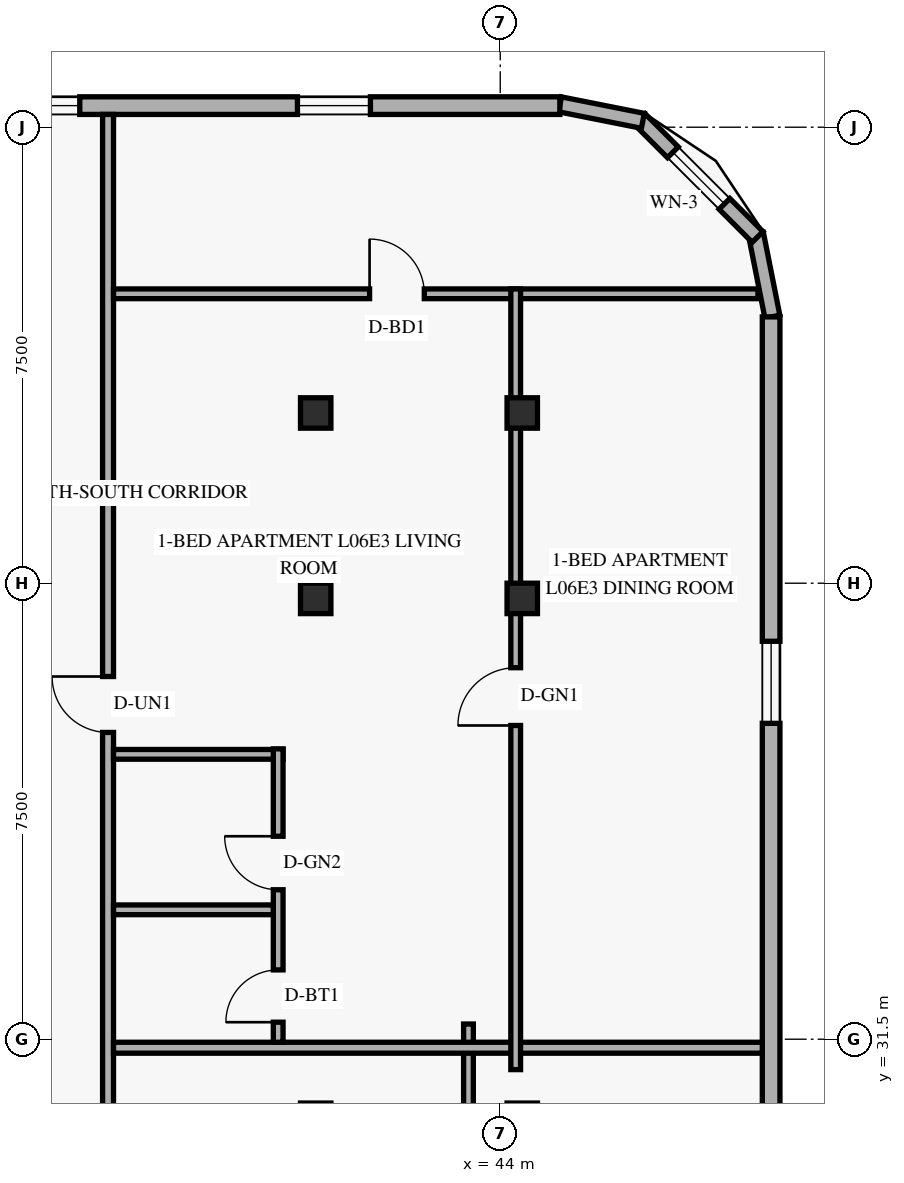
"""IFC4 building model, lengths in metres.
Left out: names, types, materials, properties, quantities, classifications, styles, units other than length and angle.
Written with IfcOpenShell. Run it as: python <this file> out.ifc"""

import sys

from ifc_helpers import new_model, si_unit, direction, frame, frame_2d, origin, origin_2d, place, context, subcontext, project, spatial, rectangle, hollow_rectangle, extrude, element, fill, save


model = new_model("IFC4")
c1 = context("Model", 3, precision=1e-05, world=origin(), true_north=direction((0.0, 1.0)))
c2 = subcontext(c1, "Body", "Model", "MODEL_VIEW")
j1 = project(units=[si_unit("LENGTHUNIT", "METRE"), si_unit("PLANEANGLEUNIT", "RADIAN")], contexts=[c1])
p1 = place(None, origin())
s1 = spatial("IfcSite", under=j1, at=p1, CompositionType="ELEMENT")
p2 = place(p1, origin())
s2 = spatial("IfcBuilding", under=s1, at=p2, CompositionType="ELEMENT")
p3 = place(p2, frame((0.0, 0.0, 27.6)))
s3 = spatial("IfcBuildingStorey", under=s2, at=p3, CompositionType="ELEMENT", Elevation=27.6)
for number, where, z_axis, x_axis in (
    (1, (40.902, 38.75, 0.0), (0.035, 0.0, 0.999), (0.0, 1.0, 0.0)),
    (2, (40.902, 41.8, 0.0), (0.035, 0.0, 0.999), (0.0, 1.0, 0.0)),
):
    element("IfcColumn", number, at=place(p3, frame(where, z_axis=z_axis, x_axis=x_axis)), inside=s3, PredefinedType="COLUMN", context=c2, shape_type="SweptSolid", body=[
        extrude(hollow_rectangle(XDim=0.5, YDim=0.5, WallThickness=0.022, at=origin_2d()), origin(), (0.0, 0.0, 1.0), 3.602),
    ])
for number, where, z_axis, x_axis in (
    (3, (44.258, 38.75, 0.0), (0.058, 0.0, 0.998), (0.0, 1.0, 0.0)),
    (4, (44.258, 41.8, 0.0), (0.058, 0.0, 0.998), (0.0, 1.0, 0.0)),
):
    element("IfcColumn", number, at=place(p3, frame(where, z_axis=z_axis, x_axis=x_axis)), inside=s3, PredefinedType="COLUMN", context=c2, shape_type="SweptSolid", body=[
        extrude(hollow_rectangle(XDim=0.5, YDim=0.5, WallThickness=0.022, at=origin_2d()), origin(), (0.0, 0.0, 1.0), 3.606),
    ])
p4 = place(p3, frame((48.476, 43.384, 0.0), z_axis=(0.0, 0.0, 1.0), x_axis=(-0.19496651342, 0.980809899341, 0.0)))
e5 = element("IfcWall", 5, at=p4, inside=s3, PredefinedType="SOLIDWALL", context=c2, shape_type="SweptSolid", body=[
    extrude(rectangle(XDim=1.389, YDim=0.25, at=frame_2d((0.694, 0.0))), origin(), (0.0, 0.0, 1.0), 3.36),
])
p5 = place(p3, frame((48.232, 44.695, 0.0), z_axis=(0.0, 0.0, 1.0), x_axis=(-0.707106781187, 0.707106781187, 0.0)))
e6 = element("IfcWall", 6, at=p5, inside=s3, PredefinedType="SOLIDWALL", context=c2, shape_type="SweptSolid", body=[
    extrude(rectangle(XDim=2.739, YDim=0.25, at=frame_2d((1.37, 0.0))), origin(), (0.0, 0.0, 1.0), 3.36),
])
p6 = place(p5, frame((0.77, 0.0, 0.85)))
e7 = element("IfcOpeningElement", 7, at=p6, cuts=e6, PredefinedType="OPENING", context=c2, shape_type="SweptSolid", body=[
    extrude(rectangle(XDim=1.2, YDim=1.5, at=frame_2d((0.6, 0.75))), frame((0.0, 0.135, 0.0), z_axis=(0.0, -1.0, 0.0), x_axis=(1.0, 0.0, 0.0)), (0.0, 0.0, 1.0), 0.27),
])
p7 = place(p3, frame((46.345, 46.605, 0.0), z_axis=(0.0, 0.0, 1.0), x_axis=(-0.980809899341, 0.19496651342, 0.0)))
e8 = element("IfcWall", 8, at=p7, inside=s3, PredefinedType="SOLIDWALL", context=c2, shape_type="SweptSolid", body=[
    extrude(rectangle(XDim=1.389, YDim=0.25, at=frame_2d((0.694, 0.0))), origin(), (0.0, 0.0, 1.0), 3.36),
])
p8 = place(p3, frame((48.455, 4.62, 0.0), z_axis=(0.0, 0.0, 1.0), x_axis=(0.0, 1.0, 0.0)))
e9 = element("IfcWall", 9, at=p8, inside=s3, PredefinedType="SOLIDWALL", context=c2, shape_type="SweptSolid", body=[
    extrude(rectangle(XDim=38.76, YDim=0.29, at=frame_2d((19.38, 0.0))), origin(), (0.0, 0.0, 1.0), 3.36),
])
p9 = place(p8, frame((4.875, 0.0, 0.85)))
e10 = element("IfcOpeningElement", 10, at=p9, cuts=e9, PredefinedType="OPENING", context=c2, shape_type="SweptSolid", body=[
    extrude(rectangle(XDim=1.35, YDim=1.55, at=frame_2d((0.675, 0.775))), frame((0.0, 0.155, 0.0), z_axis=(0.0, -1.0, 0.0), x_axis=(1.0, 0.0, 0.0)), (0.0, 0.0, 1.0), 0.31),
])
p10 = place(p8, frame((12.579, 0.0, 0.85)))
e11 = element("IfcOpeningElement", 11, at=p10, cuts=e9, PredefinedType="OPENING", context=c2, shape_type="SweptSolid", body=[
    extrude(rectangle(XDim=1.35, YDim=1.55, at=frame_2d((0.675, 0.775))), frame((0.0, 0.155, 0.0), z_axis=(0.0, -1.0, 0.0), x_axis=(1.0, 0.0, 0.0)), (0.0, 0.0, 1.0), 0.31),
])
p11 = place(p8, frame((18.404, 0.0, 0.85)))
e12 = element("IfcOpeningElement", 12, at=p11, cuts=e9, PredefinedType="OPENING", context=c2, shape_type="SweptSolid", body=[
    extrude(rectangle(XDim=1.35, YDim=1.55, at=frame_2d((0.675, 0.775))), frame((0.0, 0.155, 0.0), z_axis=(0.0, -1.0, 0.0), x_axis=(1.0, 0.0, 0.0)), (0.0, 0.0, 1.0), 0.31),
])
p12 = place(p8, frame((24.07, 0.0, 0.85)))
e13 = element("IfcOpeningElement", 13, at=p12, cuts=e9, PredefinedType="OPENING", context=c2, shape_type="SweptSolid", body=[
    extrude(rectangle(XDim=1.35, YDim=1.55, at=frame_2d((0.675, 0.775))), frame((0.0, 0.155, 0.0), z_axis=(0.0, -1.0, 0.0), x_axis=(1.0, 0.0, 0.0)), (0.0, 0.0, 1.0), 0.31),
])
p13 = place(p8, frame((32.075, 0.0, 0.85)))
e14 = element("IfcOpeningElement", 14, at=p13, cuts=e9, PredefinedType="OPENING", context=c2, shape_type="SweptSolid", body=[
    extrude(rectangle(XDim=1.35, YDim=1.55, at=frame_2d((0.675, 0.775))), frame((0.0, 0.155, 0.0), z_axis=(0.0, -1.0, 0.0), x_axis=(1.0, 0.0, 0.0)), (0.0, 0.0, 1.0), 0.31),
])
p14 = place(p3, frame((44.98, 46.855, 0.0), z_axis=(0.0, 0.0, 1.0), x_axis=(-1.0, 0.0, 0.0)))
e15 = element("IfcWall", 15, at=p14, inside=s3, PredefinedType="SOLIDWALL", context=c2, shape_type="SweptSolid", body=[
    extrude(rectangle(XDim=39.56, YDim=0.29, at=frame_2d((19.78, 0.0))), origin(), (0.0, 0.0, 1.0), 3.36),
])
p15 = place(p14, frame((35.52, 0.0, 0.85)))
e16 = element("IfcOpeningElement", 16, at=p15, cuts=e15, PredefinedType="OPENING", context=c2, shape_type="SweptSolid", body=[
    extrude(rectangle(XDim=1.2, YDim=1.5, at=frame_2d((0.6, 0.75))), frame((0.0, 0.155, 0.0), z_axis=(0.0, -1.0, 0.0), x_axis=(1.0, 0.0, 0.0)), (0.0, 0.0, 1.0), 0.31),
])
p16 = place(p14, frame((31.18, 0.0, 0.85)))
e17 = element("IfcOpeningElement", 17, at=p16, cuts=e15, PredefinedType="OPENING", context=c2, shape_type="SweptSolid", body=[
    extrude(rectangle(XDim=1.2, YDim=1.5, at=frame_2d((0.6, 0.75))), frame((0.0, 0.155, 0.0), z_axis=(0.0, -1.0, 0.0), x_axis=(1.0, 0.0, 0.0)), (0.0, 0.0, 1.0), 0.31),
])
p17 = place(p14, frame((26.925, 0.0, 0.85)))
e18 = element("IfcOpeningElement", 18, at=p17, cuts=e15, PredefinedType="OPENING", context=c2, shape_type="SweptSolid", body=[
    extrude(rectangle(XDim=1.2, YDim=1.5, at=frame_2d((0.6, 0.75))), frame((0.0, 0.155, 0.0), z_axis=(0.0, -1.0, 0.0), x_axis=(1.0, 0.0, 0.0)), (0.0, 0.0, 1.0), 0.31),
])
p18 = place(p14, frame((21.5, 0.0, 0.85)))
e19 = element("IfcOpeningElement", 19, at=p18, cuts=e15, PredefinedType="OPENING", context=c2, shape_type="SweptSolid", body=[
    extrude(rectangle(XDim=1.2, YDim=1.5, at=frame_2d((0.6, 0.75))), frame((0.0, 0.155, 0.0), z_axis=(0.0, -1.0, 0.0), x_axis=(1.0, 0.0, 0.0)), (0.0, 0.0, 1.0), 0.31),
])
p19 = place(p14, frame((16.265, 0.0, 0.85)))
e20 = element("IfcOpeningElement", 20, at=p19, cuts=e15, PredefinedType="OPENING", context=c2, shape_type="SweptSolid", body=[
    extrude(rectangle(XDim=1.2, YDim=1.5, at=frame_2d((0.6, 0.75))), frame((0.0, 0.155, 0.0), z_axis=(0.0, -1.0, 0.0), x_axis=(1.0, 0.0, 0.0)), (0.0, 0.0, 1.0), 0.31),
])
p20 = place(p14, frame((11.03, 0.0, 0.85)))
e21 = element("IfcOpeningElement", 21, at=p20, cuts=e15, PredefinedType="OPENING", context=c2, shape_type="SweptSolid", body=[
    extrude(rectangle(XDim=1.2, YDim=1.5, at=frame_2d((0.6, 0.75))), frame((0.0, 0.155, 0.0), z_axis=(0.0, -1.0, 0.0), x_axis=(1.0, 0.0, 0.0)), (0.0, 0.0, 1.0), 0.31),
])
p21 = place(p14, frame((7.895, 0.0, 0.85)))
e22 = element("IfcOpeningElement", 22, at=p21, cuts=e15, PredefinedType="OPENING", context=c2, shape_type="SweptSolid", body=[
    extrude(rectangle(XDim=1.2, YDim=1.5, at=frame_2d((0.6, 0.75))), frame((0.0, 0.155, 0.0), z_axis=(0.0, -1.0, 0.0), x_axis=(1.0, 0.0, 0.0)), (0.0, 0.0, 1.0), 0.31),
])
p22 = place(p14, frame((3.115, 0.0, 0.85)))
e23 = element("IfcOpeningElement", 23, at=p22, cuts=e15, PredefinedType="OPENING", context=c2, shape_type="SweptSolid", body=[
    extrude(rectangle(XDim=1.2, YDim=1.5, at=frame_2d((0.6, 0.75))), frame((0.0, 0.155, 0.0), z_axis=(0.0, -1.0, 0.0), x_axis=(1.0, 0.0, 0.0)), (0.0, 0.0, 1.0), 0.31),
])
p23 = place(p3, frame((37.55, 1.29, 0.0), z_axis=(0.0, 0.0, 1.0), x_axis=(0.0, 1.0, 0.0)))
e24 = element("IfcWall", 24, at=p23, inside=s3, PredefinedType="STANDARD", context=c2, shape_type="SweptSolid", body=[
    extrude(rectangle(XDim=45.42, YDim=0.18, at=frame_2d((22.71, 0.0))), origin(), (0.0, 0.0, 1.0), 2.649),
])
p24 = place(p23, frame((8.49, 0.0, 0.0)))
e25 = element("IfcOpeningElement", 25, at=p24, cuts=e24, PredefinedType="OPENING", context=c2, shape_type="SweptSolid", body=[
    extrude(rectangle(XDim=0.92, YDim=2.15, at=frame_2d((0.46, 1.075))), frame((0.0, 0.1, 0.0), z_axis=(0.0, -1.0, 0.0), x_axis=(1.0, 0.0, 0.0)), (0.0, 0.0, 1.0), 0.2),
])
p25 = place(p23, frame((20.073, 0.0, 0.0)))
e26 = element("IfcOpeningElement", 26, at=p25, cuts=e24, PredefinedType="OPENING", context=c2, shape_type="SweptSolid", body=[
    extrude(rectangle(XDim=0.92, YDim=2.15, at=frame_2d((0.46, 1.075))), frame((0.0, 0.1, 0.0), z_axis=(0.0, -1.0, 0.0), x_axis=(1.0, 0.0, 0.0)), (0.0, 0.0, 1.0), 0.2),
])
p26 = place(p23, frame((35.256, 0.0, 0.0)))
e27 = element("IfcOpeningElement", 27, at=p26, cuts=e24, PredefinedType="OPENING", context=c2, shape_type="SweptSolid", body=[
    extrude(rectangle(XDim=0.92, YDim=2.15, at=frame_2d((0.46, 1.075))), frame((0.0, 0.1, 0.0), z_axis=(0.0, -1.0, 0.0), x_axis=(1.0, 0.0, 0.0)), (0.0, 0.0, 1.0), 0.2),
])
p27 = place(p3, frame((43.477, 27.29, 0.0), z_axis=(0.0, 0.0, 1.0), x_axis=(0.0, 1.0, 0.0)))
e28 = element("IfcWall", 28, at=p27, inside=s3, PredefinedType="PARTITIONING", context=c2, shape_type="SweptSolid", body=[
    extrude(rectangle(XDim=4.46, YDim=0.16, at=frame_2d((2.23, 0.0))), origin(), (0.0, 0.0, 1.0), 2.649),
])
p28 = place(p3, frame((37.64, 31.36, 0.0), z_axis=(0.0, 0.0, 1.0), x_axis=(1.0, 0.0, 0.0)))
e29 = element("IfcWall", 29, at=p28, inside=s3, PredefinedType="PARTITIONING", context=c2, shape_type="SweptSolid", body=[
    extrude(rectangle(XDim=10.67, YDim=0.18, at=frame_2d((5.335, 0.0))), origin(), (0.0, 0.0, 1.0), 2.649),
])
p29 = place(p3, frame((37.64, 43.76, 0.0), z_axis=(0.0, 0.0, 1.0), x_axis=(1.0, 0.0, 0.0)))
e30 = element("IfcWall", 30, at=p29, inside=s3, PredefinedType="PARTITIONING", context=c2, shape_type="SweptSolid", body=[
    extrude(rectangle(XDim=10.598, YDim=0.16, at=frame_2d((5.299, 0.0))), origin(), (0.0, 0.0, 1.0), 3.36),
])
p30 = place(p29, frame((4.211, 0.0, 0.0)))
e31 = element("IfcOpeningElement", 31, at=p30, cuts=e30, PredefinedType="OPENING", context=c2, shape_type="SweptSolid", body=[
    extrude(rectangle(XDim=0.9, YDim=2.14, at=frame_2d((0.45, 1.07))), frame((0.0, 0.09, 0.0), z_axis=(0.0, -1.0, 0.0), x_axis=(1.0, 0.0, 0.0)), (0.0, 0.0, 1.0), 0.18),
])
p31 = place(p3, frame((37.64, 36.186, 0.0), z_axis=(0.0, 0.0, 1.0), x_axis=(1.0, 0.0, 0.0)))
e32 = element("IfcWall", 32, at=p31, inside=s3, PredefinedType="PLUMBINGWALL", context=c2, shape_type="SweptSolid", body=[
    extrude(rectangle(XDim=2.788, YDim=0.16, at=frame_2d((1.394, 0.0))), origin(), (0.0, 0.0, 1.0), 3.36),
])
p32 = place(p3, frame((40.348, 31.45, 0.0), z_axis=(0.0, 0.0, 1.0), x_axis=(0.0, 1.0, 0.0)))
e33 = element("IfcWall", 33, at=p32, inside=s3, PredefinedType="PLUMBINGWALL", context=c2, shape_type="SweptSolid", body=[
    extrude(rectangle(XDim=4.825, YDim=0.16, at=frame_2d((2.413, 0.0))), origin(), (0.0, 0.0, 1.0), 2.932),
])
p33 = place(p32, frame((0.33, 0.0, 0.0)))
e34 = element("IfcOpeningElement", 34, at=p33, cuts=e33, PredefinedType="OPENING", context=c2, shape_type="SweptSolid", body=[
    extrude(rectangle(XDim=0.86, YDim=2.12, at=frame_2d((0.43, 1.06))), frame((0.0, 0.09, 0.0), z_axis=(0.0, -1.0, 0.0), x_axis=(1.0, 0.0, 0.0)), (0.0, 0.0, 1.0), 0.18),
])
p34 = place(p32, frame((2.508, 0.0, 0.0)))
e35 = element("IfcOpeningElement", 35, at=p34, cuts=e33, PredefinedType="OPENING", context=c2, shape_type="SweptSolid", body=[
    extrude(rectangle(XDim=0.88, YDim=2.12, at=frame_2d((0.44, 1.06))), frame((0.0, 0.09, 0.0), z_axis=(0.0, -1.0, 0.0), x_axis=(1.0, 0.0, 0.0)), (0.0, 0.0, 1.0), 0.18),
])
p35 = place(p3, frame((37.64, 33.628, 0.0), z_axis=(0.0, 0.0, 1.0), x_axis=(1.0, 0.0, 0.0)))
e36 = element("IfcWall", 36, at=p35, inside=s3, PredefinedType="PLUMBINGWALL", context=c2, shape_type="SweptSolid", body=[
    extrude(rectangle(XDim=2.628, YDim=0.16, at=frame_2d((1.314, 0.0))), origin(), (0.0, 0.0, 1.0), 3.36),
])
p36 = place(p3, frame((44.254, 31.0, 0.0), z_axis=(0.0, 0.0, 1.0), x_axis=(0.0, 1.0, 0.0)))
e37 = element("IfcWall", 37, at=p36, inside=s3, PredefinedType="PARTITIONING", context=c2, shape_type="SweptSolid", body=[
    extrude(rectangle(XDim=12.84, YDim=0.16, at=frame_2d((6.42, 0.0))), origin(), (0.0, 0.0, 1.0), 2.649),
])
p37 = place(p36, frame((5.66, 0.0, 0.0)))
e38 = element("IfcOpeningElement", 38, at=p37, cuts=e37, PredefinedType="OPENING", context=c2, shape_type="SweptSolid", body=[
    extrude(rectangle(XDim=0.95, YDim=2.15, at=frame_2d((0.475, 1.075))), frame((0.0, 0.09, 0.0), z_axis=(0.0, -1.0, 0.0), x_axis=(1.0, 0.0, 0.0)), (0.0, 0.0, 1.0), 0.18),
])
p38 = place(p6, origin())
e39 = element("IfcWindow", 39, at=p38, inside=s3, PartitioningType="SINGLE_PANEL", PredefinedType="WINDOW", context=c2, shape_type="SweptSolid", body=[
    extrude(rectangle(XDim=1.2, YDim=1.5, at=frame_2d((0.6, 0.75))), frame((0.0, 0.03, 0.0), z_axis=(0.0, -1.0, 0.0), x_axis=(1.0, 0.0, 0.0)), (0.0, 0.0, 1.0), 0.06),
])
fill(e7, e39)
p39 = place(p13, origin())
e40 = element("IfcWindow", 40, at=p39, inside=s3, PartitioningType="SINGLE_PANEL", PredefinedType="WINDOW", context=c2, shape_type="SweptSolid", body=[
    extrude(rectangle(XDim=1.35, YDim=1.55, at=frame_2d((0.675, 0.775))), frame((0.0, 0.03, 0.0), z_axis=(0.0, -1.0, 0.0), x_axis=(1.0, 0.0, 0.0)), (0.0, 0.0, 1.0), 0.06),
])
fill(e14, e40)
p40 = place(p21, origin())
e41 = element("IfcWindow", 41, at=p40, inside=s3, PartitioningType="SINGLE_PANEL", PredefinedType="WINDOW", context=c2, shape_type="SweptSolid", body=[
    extrude(rectangle(XDim=1.2, YDim=1.5, at=frame_2d((0.6, 0.75))), frame((0.0, 0.03, 0.0), z_axis=(0.0, -1.0, 0.0), x_axis=(1.0, 0.0, 0.0)), (0.0, 0.0, 1.0), 0.06),
])
fill(e22, e41)
p41 = place(p22, origin())
e42 = element("IfcWindow", 42, at=p41, inside=s3, PartitioningType="SINGLE_PANEL", PredefinedType="WINDOW", context=c2, shape_type="SweptSolid", body=[
    extrude(rectangle(XDim=1.2, YDim=1.5, at=frame_2d((0.6, 0.75))), frame((0.0, 0.03, 0.0), z_axis=(0.0, -1.0, 0.0), x_axis=(1.0, 0.0, 0.0)), (0.0, 0.0, 1.0), 0.06),
])
fill(e23, e42)
p42 = place(p37, origin())
e43 = element("IfcDoor", 43, at=p42, inside=s3, OperationType="SINGLE_SWING_LEFT", PredefinedType="DOOR", context=c2, shape_type="SweptSolid", body=[
    extrude(rectangle(XDim=0.95, YDim=2.15, at=frame_2d((0.475, 1.075))), frame((0.0, 0.025, 0.0), z_axis=(0.0, -1.0, 0.0), x_axis=(1.0, 0.0, 0.0)), (0.0, 0.0, 1.0), 0.05),
])
fill(e38, e43)
p43 = place(p26, origin())
e44 = element("IfcDoor", 44, at=p43, inside=s3, OperationType="SINGLE_SWING_RIGHT", PredefinedType="DOOR", context=c2, shape_type="SweptSolid", body=[
    extrude(rectangle(XDim=0.92, YDim=2.15, at=frame_2d((0.46, 1.075))), frame((0.0, 0.025, 0.0), z_axis=(0.0, -1.0, 0.0), x_axis=(1.0, 0.0, 0.0)), (0.0, 0.0, 1.0), 0.05),
])
fill(e27, e44)
p44 = place(p33, origin())
e45 = element("IfcDoor", 45, at=p44, inside=s3, OperationType="SINGLE_SWING_LEFT", PredefinedType="DOOR", context=c2, shape_type="SweptSolid", body=[
    extrude(rectangle(XDim=0.86, YDim=2.12, at=frame_2d((0.43, 1.06))), frame((0.0, 0.025, 0.0), z_axis=(0.0, -1.0, 0.0), x_axis=(1.0, 0.0, 0.0)), (0.0, 0.0, 1.0), 0.05),
])
fill(e34, e45)
p45 = place(p34, origin())
e46 = element("IfcDoor", 46, at=p45, inside=s3, OperationType="SINGLE_SWING_RIGHT", PredefinedType="DOOR", context=c2, shape_type="SweptSolid", body=[
    extrude(rectangle(XDim=0.88, YDim=2.12, at=frame_2d((0.44, 1.06))), frame((0.0, 0.025, 0.0), z_axis=(0.0, -1.0, 0.0), x_axis=(1.0, 0.0, 0.0)), (0.0, 0.0, 1.0), 0.05),
])
fill(e35, e46)
p46 = place(p30, origin())
e47 = element("IfcDoor", 47, at=p46, inside=s3, OperationType="SINGLE_SWING_LEFT", PredefinedType="DOOR", context=c2, shape_type="SweptSolid", body=[
    extrude(rectangle(XDim=0.9, YDim=2.14, at=frame_2d((0.45, 1.07))), frame((0.0, 0.025, 0.0), z_axis=(0.0, -1.0, 0.0), x_axis=(1.0, 0.0, 0.0)), (0.0, 0.0, 1.0), 0.05),
])
fill(e31, e47)
save(model, sys.argv[1])
